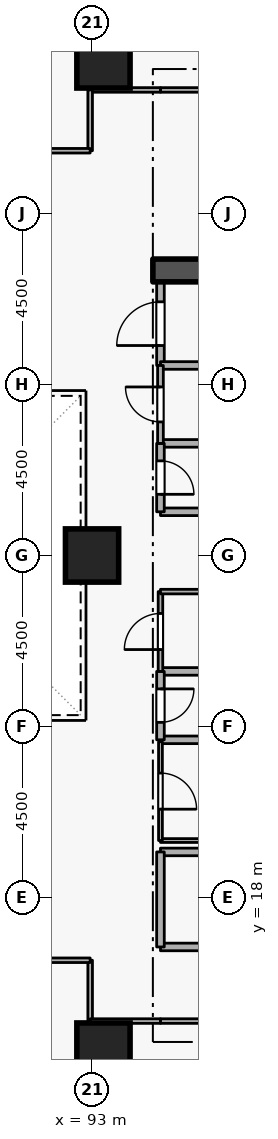
"""IFC4 building model, lengths in metres.
Left out: names, types, materials, properties, quantities, classifications, styles, units other than length and angle.
Written with IfcOpenShell. Run it as: python <this file> out.ifc"""

import sys

from ifc_helpers import new_model, si_unit, direction, frame, frame_2d, origin, origin_2d, place, context, subcontext, project, spatial, rectangle, extrude, element, fill, save


model = new_model("IFC4")
c1 = context("Model", 3, precision=1e-05, world=origin(), true_north=direction((0.0, 1.0)))
c2 = subcontext(c1, "Body", "Model", "MODEL_VIEW")
j1 = project(units=[si_unit("LENGTHUNIT", "METRE"), si_unit("PLANEANGLEUNIT", "RADIAN")], contexts=[c1])
p1 = place(None, origin())
s1 = spatial("IfcSite", under=j1, at=p1, CompositionType="ELEMENT")
p2 = place(p1, origin())
s2 = spatial("IfcBuilding", under=s1, at=p2, CompositionType="ELEMENT")
p3 = place(p2, frame((0.0, 0.0, 27.9)))
s3 = spatial("IfcBuildingStorey", under=s2, at=p3, CompositionType="ELEMENT", Elevation=27.9)
p4 = place(p3, frame((94.6, 34.5, 0.0), z_axis=(0.0, 0.0, 1.0), x_axis=(1.0, 0.0, 0.0)))
e1 = element("IfcWall", 1, at=p4, inside=s3, PredefinedType="SHEAR", context=c2, shape_type="SweptSolid", body=[
    extrude(rectangle(XDim=5.7, YDim=0.6, at=frame_2d((2.85, 0.0))), origin(), (0.0, 0.0, 1.0), 3.6),
])
for number, where, z_axis, x_axis in (
    (2, (93.3, 14.0, 0.0), (0.0, 0.0, 1.0), (1.0, 0.0, 0.0)),
    (3, (93.3, 40.0, 0.0), (0.0, 0.0, 1.0), (1.0, 0.0, 0.0)),
    (4, (93.0, 27.0, 0.0), (0.0, 0.0, 1.0), (1.0, 0.0, 0.0)),
):
    element("IfcColumn", number, at=place(p3, frame(where, z_axis=z_axis, x_axis=x_axis)), inside=s3, PredefinedType="COLUMN", context=c2, shape_type="SweptSolid", body=[
        extrude(rectangle(XDim=1.4, YDim=1.4, at=origin_2d()), origin(), (0.0, 0.0, 1.0), 3.6),
    ])
p5 = place(p3, frame((94.8, 16.7, 0.0), z_axis=(0.0, 0.0, 1.0), x_axis=(1.0, 0.0, 0.0)))
e5 = element("IfcWall", 5, at=p5, inside=s3, PredefinedType="STANDARD", context=c2, shape_type="SweptSolid", body=[
    extrude(rectangle(XDim=5.7, YDim=0.2, at=frame_2d((2.85, 0.0))), origin(), (0.0, 0.0, 1.0), 3.34),
])
p6 = place(p5, frame((2.275, 0.0, 0.0)))
e6 = element("IfcOpeningElement", 6, at=p6, cuts=e5, PredefinedType="OPENING", context=c2, shape_type="SweptSolid", body=[
    extrude(rectangle(XDim=1.15, YDim=2.1, at=frame_2d((0.575, 1.05))), frame((0.0, 0.11, 0.0), z_axis=(0.0, -1.0, 0.0), x_axis=(1.0, 0.0, 0.0)), (0.0, 0.0, 1.0), 0.22),
])
p7 = place(p3, frame((97.1, 19.2, 0.0), z_axis=(0.0, 0.0, 1.0), x_axis=(-1.0, 0.0, 0.0)))
e7 = element("IfcWall", 7, at=p7, inside=s3, PredefinedType="STANDARD", context=c2, shape_type="SweptSolid", body=[
    extrude(rectangle(XDim=2.3, YDim=0.2, at=frame_2d((1.15, 0.0))), origin(), (0.0, 0.0, 1.0), 2.545),
])
p8 = place(p3, frame((94.8, 19.2, 0.0), z_axis=(0.0, 0.0, 1.0), x_axis=(0.0, -1.0, 0.0)))
e8 = element("IfcWall", 8, at=p8, inside=s3, PredefinedType="STANDARD", context=c2, shape_type="SweptSolid", body=[
    extrude(rectangle(XDim=2.5, YDim=0.2, at=frame_2d((1.25, 0.0))), origin(), (0.0, 0.0, 1.0), 3.34),
])
for number, where, z_axis, x_axis in (
    (9, (94.8, 28.15, 0.0), (0.0, 0.0, 1.0), (1.0, 0.0, 0.0)),
    (10, (96.85, 29.95, 0.0), (0.0, 0.0, 1.0), (-1.0, 0.0, 0.0)),
):
    element("IfcWall", number, at=place(p3, frame(where, z_axis=z_axis, x_axis=x_axis)), inside=s3, PredefinedType="STANDARD", context=c2, shape_type="SweptSolid", body=[
        extrude(rectangle(XDim=2.05, YDim=0.2, at=frame_2d((1.025, 0.0))), origin(), (0.0, 0.0, 1.0), 3.34),
    ])
p9 = place(p3, frame((94.8, 29.95, 0.0), z_axis=(0.0, 0.0, 1.0), x_axis=(0.0, -1.0, 0.0)))
e11 = element("IfcWall", 11, at=p9, inside=s3, PredefinedType="STANDARD", context=c2, shape_type="SweptSolid", body=[
    extrude(rectangle(XDim=1.8, YDim=0.2, at=frame_2d((0.9, 0.0))), origin(), (0.0, 0.0, 1.0), 3.34),
])
p10 = place(p9, frame((0.46, 0.0, 0.0)))
e12 = element("IfcOpeningElement", 12, at=p10, cuts=e11, PredefinedType="OPENING", context=c2, shape_type="SweptSolid", body=[
    extrude(rectangle(XDim=0.88, YDim=2.04, at=frame_2d((0.44, 1.02))), frame((0.0, 0.11, 0.0), z_axis=(0.0, -1.0, 0.0), x_axis=(1.0, 0.0, 0.0)), (0.0, 0.0, 1.0), 0.22),
])
for number, where, z_axis, x_axis in (
    (13, (94.8, 22.15, 0.0), (0.0, 0.0, 1.0), (1.0, 0.0, 0.0)),
    (14, (96.85, 23.95, 0.0), (0.0, 0.0, 1.0), (-1.0, 0.0, 0.0)),
):
    element("IfcWall", number, at=place(p3, frame(where, z_axis=z_axis, x_axis=x_axis)), inside=s3, PredefinedType="STANDARD", context=c2, shape_type="SweptSolid", body=[
        extrude(rectangle(XDim=2.05, YDim=0.2, at=frame_2d((1.025, 0.0))), origin(), (0.0, 0.0, 1.0), 3.34),
    ])
p11 = place(p3, frame((94.8, 23.95, 0.0), z_axis=(0.0, 0.0, 1.0), x_axis=(0.0, -1.0, 0.0)))
e15 = element("IfcWall", 15, at=p11, inside=s3, PredefinedType="STANDARD", context=c2, shape_type="SweptSolid", body=[
    extrude(rectangle(XDim=1.8, YDim=0.2, at=frame_2d((0.9, 0.0))), origin(), (0.0, 0.0, 1.0), 3.34),
])
p12 = place(p11, frame((0.46, 0.0, 0.0)))
e16 = element("IfcOpeningElement", 16, at=p12, cuts=e15, PredefinedType="OPENING", context=c2, shape_type="SweptSolid", body=[
    extrude(rectangle(XDim=0.88, YDim=2.04, at=frame_2d((0.44, 1.02))), frame((0.0, 0.11, 0.0), z_axis=(0.0, -1.0, 0.0), x_axis=(1.0, 0.0, 0.0)), (0.0, 0.0, 1.0), 0.22),
])
p13 = place(p3, frame((94.8, 32.0, 0.0), z_axis=(0.0, 0.0, 1.0), x_axis=(0.0, 1.0, 0.0)))
e17 = element("IfcWall", 17, at=p13, inside=s3, PredefinedType="STANDARD", context=c2, shape_type="SweptSolid", body=[
    extrude(rectangle(XDim=2.2, YDim=0.2, at=frame_2d((1.1, 0.0))), origin(), (0.0, 0.0, 1.0), 3.34),
])
p14 = place(p13, frame((0.525, 0.0, 0.0)))
e18 = element("IfcOpeningElement", 18, at=p14, cuts=e17, PredefinedType="OPENING", context=c2, shape_type="SweptSolid", body=[
    extrude(rectangle(XDim=1.15, YDim=2.1, at=frame_2d((0.575, 1.05))), frame((0.0, 0.11, 0.0), z_axis=(0.0, -1.0, 0.0), x_axis=(1.0, 0.0, 0.0)), (0.0, 0.0, 1.0), 0.22),
])
p15 = place(p3, frame((96.85, 32.0, 0.0), z_axis=(0.0, 0.0, 1.0), x_axis=(-1.0, 0.0, 0.0)))
e19 = element("IfcWall", 19, at=p15, inside=s3, PredefinedType="STANDARD", context=c2, shape_type="SweptSolid", body=[
    extrude(rectangle(XDim=2.05, YDim=0.2, at=frame_2d((1.025, 0.0))), origin(), (0.0, 0.0, 1.0), 3.34),
])
p16 = place(p3, frame((94.8, 19.5, 0.0), z_axis=(0.0, 0.0, 1.0), x_axis=(1.0, 0.0, 0.0)))
e20 = element("IfcWall", 20, at=p16, inside=s3, PredefinedType="PARTITIONING", context=c2, shape_type="SweptSolid", body=[
    extrude(rectangle(XDim=2.05, YDim=0.1, at=frame_2d((1.025, 0.0))), origin(), (0.0, 0.0, 1.0), 2.545),
])
p17 = place(p3, frame((94.8, 22.1, 0.0), z_axis=(0.0, 0.0, 1.0), x_axis=(0.0, -1.0, 0.0)))
e21 = element("IfcWall", 21, at=p17, inside=s3, PredefinedType="PARTITIONING", context=c2, shape_type="SweptSolid", body=[
    extrude(rectangle(XDim=2.6, YDim=0.1, at=frame_2d((1.3, 0.0))), origin(), (0.0, 0.0, 1.0), 3.34),
])
p18 = place(p17, frame((0.825, 0.0, 0.0)))
e22 = element("IfcOpeningElement", 22, at=p18, cuts=e21, PredefinedType="OPENING", context=c2, shape_type="SweptSolid", body=[
    extrude(rectangle(XDim=0.95, YDim=2.1, at=frame_2d((0.475, 1.05))), frame((0.0, 0.06, 0.0), z_axis=(0.0, -1.0, 0.0), x_axis=(1.0, 0.0, 0.0)), (0.0, 0.0, 1.0), 0.12),
])
p19 = place(p3, frame((94.8, 23.95, 0.0), z_axis=(0.0, 0.0, 1.0), x_axis=(0.0, 1.0, 0.0)))
e23 = element("IfcWall", 23, at=p19, inside=s3, PredefinedType="PARTITIONING", context=c2, shape_type="SweptSolid", body=[
    extrude(rectangle(XDim=2.1, YDim=0.12, at=frame_2d((1.05, 0.0))), origin(), (0.0, 0.0, 1.0), 3.34),
])
p20 = place(p19, frame((0.575, 0.0, 0.0)))
e24 = element("IfcOpeningElement", 24, at=p20, cuts=e23, PredefinedType="OPENING", context=c2, shape_type="SweptSolid", body=[
    extrude(rectangle(XDim=0.95, YDim=2.1, at=frame_2d((0.475, 1.05))), frame((0.0, 0.07, 0.0), z_axis=(0.0, -1.0, 0.0), x_axis=(1.0, 0.0, 0.0)), (0.0, 0.0, 1.0), 0.14),
])
p21 = place(p3, frame((94.8, 26.05, 0.0), z_axis=(0.0, 0.0, 1.0), x_axis=(1.0, 0.0, 0.0)))
e25 = element("IfcWall", 25, at=p21, inside=s3, PredefinedType="PARTITIONING", context=c2, shape_type="SweptSolid", body=[
    extrude(rectangle(XDim=2.05, YDim=0.12, at=frame_2d((1.025, 0.0))), origin(), (0.0, 0.0, 1.0), 3.34),
])
p22 = place(p3, frame((94.8, 29.95, 0.0), z_axis=(0.0, 0.0, 1.0), x_axis=(0.0, 1.0, 0.0)))
e26 = element("IfcWall", 26, at=p22, inside=s3, PredefinedType="PARTITIONING", context=c2, shape_type="SweptSolid", body=[
    extrude(rectangle(XDim=2.05, YDim=0.15, at=frame_2d((1.025, 0.0))), origin(), (0.0, 0.0, 1.0), 3.34),
])
p23 = place(p22, frame((0.565, 0.0, 0.0)))
e27 = element("IfcOpeningElement", 27, at=p23, cuts=e26, PredefinedType="OPENING", context=c2, shape_type="SweptSolid", body=[
    extrude(rectangle(XDim=0.92, YDim=2.08, at=frame_2d((0.46, 1.04))), frame((0.0, 0.085, 0.0), z_axis=(0.0, -1.0, 0.0), x_axis=(1.0, 0.0, 0.0)), (0.0, 0.0, 1.0), 0.17),
])
p24 = place(p3, frame((92.95, 16.35, 0.0), z_axis=(0.0, 0.0, 1.0), x_axis=(0.0, -1.0, 0.0)))
e28 = element("IfcWall", 28, at=p24, inside=s3, PredefinedType="PARTITIONING", context=c2, shape_type="SweptSolid", body=[
    extrude(rectangle(XDim=1.6, YDim=0.12, at=frame_2d((0.8, 0.0))), origin(), (0.0, 0.0, 1.0), 3.34),
])
p25 = place(p3, frame((92.95, 14.75, 0.0), z_axis=(0.0, 0.0, 1.0), x_axis=(1.0, 0.0, 0.0)))
e29 = element("IfcWall", 29, at=p25, inside=s3, PredefinedType="PARTITIONING", context=c2, shape_type="SweptSolid", body=[
    extrude(rectangle(XDim=1.85, YDim=0.12, at=frame_2d((0.925, 0.0))), origin(), (0.0, 0.0, 1.0), 3.34),
])
p26 = place(p3, frame((94.8, 14.75, 0.0), z_axis=(0.0, 0.0, 1.0), x_axis=(1.0, 0.0, 0.0)))
e30 = element("IfcWall", 30, at=p26, inside=s3, PredefinedType="PARTITIONING", context=c2, shape_type="SweptSolid", body=[
    extrude(rectangle(XDim=9.35, YDim=0.12, at=frame_2d((4.675, 0.0))), origin(), (0.0, 0.0, 1.0), 3.34),
])
p27 = place(p26, frame((4.15, 0.0, 0.0)))
e31 = element("IfcOpeningElement", 31, at=p27, cuts=e30, PredefinedType="OPENING", context=c2, shape_type="SweptSolid", body=[
    extrude(rectangle(XDim=1.05, YDim=2.1, at=frame_2d((0.525, 1.05))), frame((0.0, 0.07, 0.0), z_axis=(0.0, -1.0, 0.0), x_axis=(1.0, 0.0, 0.0)), (0.0, 0.0, 1.0), 0.14),
])
p28 = place(p3, frame((88.5, 16.35, 0.0), z_axis=(0.0, 0.0, 1.0), x_axis=(1.0, 0.0, 0.0)))
e32 = element("IfcWall", 32, at=p28, inside=s3, PredefinedType="PARTITIONING", context=c2, shape_type="SweptSolid", body=[
    extrude(rectangle(XDim=4.45, YDim=0.12, at=frame_2d((2.225, 0.0))), origin(), (0.0, 0.0, 1.0), 3.34),
])
p29 = place(p3, frame((97.95, 39.25, 0.0), z_axis=(0.0, 0.0, 1.0), x_axis=(-1.0, 0.0, 0.0)))
e33 = element("IfcWall", 33, at=p29, inside=s3, PredefinedType="PARTITIONING", context=c2, shape_type="SweptSolid", body=[
    extrude(rectangle(XDim=3.15, YDim=0.12, at=frame_2d((1.575, 0.0))), origin(), (0.0, 0.0, 1.0), 3.34),
])
p30 = place(p3, frame((94.8, 39.25, 0.0), z_axis=(0.0, 0.0, 1.0), x_axis=(-1.0, 0.0, 0.0)))
e34 = element("IfcWall", 34, at=p30, inside=s3, PredefinedType="PARTITIONING", context=c2, shape_type="SweptSolid", body=[
    extrude(rectangle(XDim=1.85, YDim=0.12, at=frame_2d((0.925, 0.0))), origin(), (0.0, 0.0, 1.0), 3.34),
])
p31 = place(p3, frame((92.95, 39.25, 0.0), z_axis=(0.0, 0.0, 1.0), x_axis=(0.0, -1.0, 0.0)))
e35 = element("IfcWall", 35, at=p31, inside=s3, PredefinedType="PARTITIONING", context=c2, shape_type="SweptSolid", body=[
    extrude(rectangle(XDim=1.6, YDim=0.12, at=frame_2d((0.8, 0.0))), origin(), (0.0, 0.0, 1.0), 3.34),
])
p32 = place(p3, frame((92.95, 37.65, 0.0), z_axis=(0.0, 0.0, 1.0), x_axis=(-1.0, 0.0, 0.0)))
e36 = element("IfcWall", 36, at=p32, inside=s3, PredefinedType="PARTITIONING", context=c2, shape_type="SweptSolid", body=[
    extrude(rectangle(XDim=4.45, YDim=0.12, at=frame_2d((2.225, 0.0))), origin(), (0.0, 0.0, 1.0), 3.34),
])
p33 = place(p32, frame((1.7, 0.0, 0.0)))
e37 = element("IfcOpeningElement", 37, at=p33, cuts=e36, PredefinedType="OPENING", context=c2, shape_type="SweptSolid", body=[
    extrude(rectangle(XDim=1.05, YDim=2.1, at=frame_2d((0.525, 1.05))), frame((0.0, 0.07, 0.0), z_axis=(0.0, -1.0, 0.0), x_axis=(1.0, 0.0, 0.0)), (0.0, 0.0, 1.0), 0.14),
])
p34 = place(p10, origin())
e38 = element("IfcDoor", 38, at=p34, inside=s3, OperationType="SINGLE_SWING_RIGHT", PredefinedType="DOOR", context=c2, shape_type="SweptSolid", body=[
    extrude(rectangle(XDim=0.88, YDim=2.04, at=frame_2d((0.44, 1.02))), frame((0.0, 0.025, 0.0), z_axis=(0.0, -1.0, 0.0), x_axis=(1.0, 0.0, 0.0)), (0.0, 0.0, 1.0), 0.05),
])
fill(e12, e38)
p35 = place(p12, origin())
e39 = element("IfcDoor", 39, at=p35, inside=s3, OperationType="SINGLE_SWING_LEFT", PredefinedType="DOOR", context=c2, shape_type="SweptSolid", body=[
    extrude(rectangle(XDim=0.88, YDim=2.04, at=frame_2d((0.44, 1.02))), frame((0.0, 0.025, 0.0), z_axis=(0.0, -1.0, 0.0), x_axis=(1.0, 0.0, 0.0)), (0.0, 0.0, 1.0), 0.05),
])
fill(e16, e39)
p36 = place(p18, origin())
e40 = element("IfcDoor", 40, at=p36, inside=s3, OperationType="SINGLE_SWING_RIGHT", PredefinedType="DOOR", context=c2, shape_type="SweptSolid", body=[
    extrude(rectangle(XDim=0.95, YDim=2.1, at=frame_2d((0.475, 1.05))), frame((0.0, 0.025, 0.0), z_axis=(0.0, -1.0, 0.0), x_axis=(1.0, 0.0, 0.0)), (0.0, 0.0, 1.0), 0.05),
])
fill(e22, e40)
p37 = place(p20, origin())
e41 = element("IfcDoor", 41, at=p37, inside=s3, OperationType="SINGLE_SWING_LEFT", PredefinedType="DOOR", context=c2, shape_type="SweptSolid", body=[
    extrude(rectangle(XDim=0.95, YDim=2.1, at=frame_2d((0.475, 1.05))), frame((0.0, 0.025, 0.0), z_axis=(0.0, -1.0, 0.0), x_axis=(1.0, 0.0, 0.0)), (0.0, 0.0, 1.0), 0.05),
])
fill(e24, e41)
p38 = place(p23, origin())
e42 = element("IfcDoor", 42, at=p38, inside=s3, OperationType="SINGLE_SWING_RIGHT", PredefinedType="DOOR", context=c2, shape_type="SweptSolid", body=[
    extrude(rectangle(XDim=0.92, YDim=2.08, at=frame_2d((0.46, 1.04))), frame((0.0, 0.025, 0.0), z_axis=(0.0, -1.0, 0.0), x_axis=(1.0, 0.0, 0.0)), (0.0, 0.0, 1.0), 0.05),
])
fill(e27, e42)
p39 = place(p14, origin())
e43 = element("IfcDoor", 43, at=p39, inside=s3, OperationType="SINGLE_SWING_LEFT", PredefinedType="DOOR", context=c2, shape_type="SweptSolid", body=[
    extrude(rectangle(XDim=1.15, YDim=2.1, at=frame_2d((0.575, 1.05))), frame((0.0, 0.025, 0.0), z_axis=(0.0, -1.0, 0.0), x_axis=(1.0, 0.0, 0.0)), (0.0, 0.0, 1.0), 0.05),
])
fill(e18, e43)
save(model, sys.argv[1])
